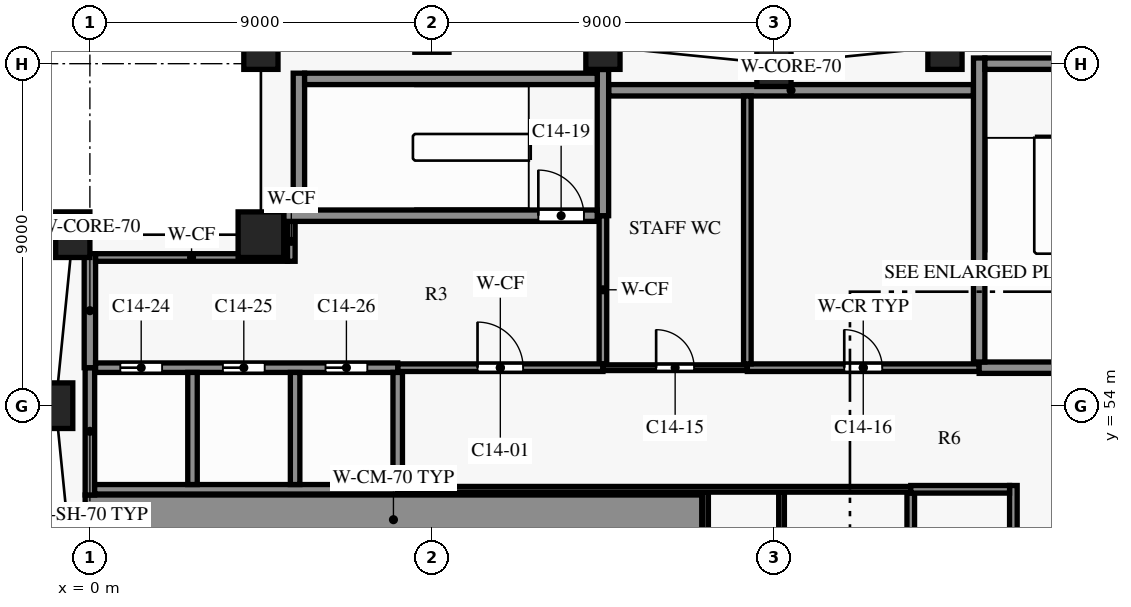
"""IFC4 building model, lengths in metres.
Left out: names, types, materials, properties, quantities, classifications, styles, units other than length and angle.
Written with IfcOpenShell. Run it as: python <this file> out.ifc"""

import sys

from ifc_helpers import new_model, si_unit, direction, frame, frame_2d, origin, origin_2d, place, context, subcontext, project, spatial, rectangle, extrude, element, fill, save


model = new_model("IFC4")
c1 = context("Model", 3, precision=1e-05, world=origin(), true_north=direction((0.0, 1.0)))
c2 = subcontext(c1, "Body", "Model", "MODEL_VIEW")
j1 = project(units=[si_unit("LENGTHUNIT", "METRE"), si_unit("PLANEANGLEUNIT", "RADIAN")], contexts=[c1])
p1 = place(None, origin())
s1 = spatial("IfcSite", under=j1, at=p1, CompositionType="ELEMENT")
p2 = place(p1, origin())
s2 = spatial("IfcBuilding", under=s1, at=p2, CompositionType="ELEMENT")
p3 = place(p2, frame((0.0, 0.0, 88.5)))
s3 = spatial("IfcBuildingStorey", under=s2, at=p3, CompositionType="ELEMENT", Elevation=88.5)
for number, where, z_axis, x_axis in (
    (1, (22.5, 63.45, 0.0), (0.0, 0.0, 1.0), (-0.995, -0.1, 0.0)),
    (2, (18.0, 63.0, 0.0), (0.0, 0.0, 1.0), (-1.0, 0.0, 0.0)),
    (3, (13.5, 63.45, 0.0), (0.0, 0.0, 1.0), (-0.995, 0.1, 0.0)),
    (4, (9.0, 63.9, 0.0), (0.0, 0.0, 1.0), (-1.0, 0.0, 0.0)),
    (5, (4.5, 63.45, 0.0), (0.0, 0.0, 1.0), (-0.995, -0.1, 0.0)),
    (6, (-0.45, 58.5, 0.0), (0.0, 0.0, 1.0), (-0.1, -0.995, 0.0)),
    (7, (-0.9, 54.0, 0.0), (0.0, 0.0, 1.0), (0.0, -1.0, 0.0)),
):
    element("IfcColumn", number, at=place(p3, frame(where, z_axis=z_axis, x_axis=x_axis)), inside=s3, PredefinedType="COLUMN", context=c2, shape_type="SweptSolid", body=[
        extrude(rectangle(XDim=0.9, YDim=1.2, at=origin_2d()), origin(), (0.0, 0.0, 1.0), 3.8),
    ])
p4 = place(p3, frame((4.5, 58.5, 0.0), z_axis=(0.0, 0.0, 1.0), x_axis=(1.0, 0.0, 0.0)))
e8 = element("IfcColumn", 8, at=p4, inside=s3, PredefinedType="COLUMN", context=c2, shape_type="SweptSolid", body=[
    extrude(rectangle(XDim=1.2, YDim=1.2, at=origin_2d()), origin(), (0.0, 0.0, 1.0), 3.8),
])
p5 = place(p3, frame((-0.125, 51.0, 0.0), z_axis=(0.0, 0.0, 1.0), x_axis=(1.0, 0.0, 0.0)))
e9 = element("IfcWall", 9, at=p5, inside=s3, PredefinedType="SHEAR", context=c2, shape_type="SweptSolid", body=[
    extrude(rectangle(XDim=16.225, YDim=1.3, at=frame_2d((8.113, 0.0))), origin(), (0.0, 0.0, 1.0), 3.5),
])
p6 = place(p3, frame((8.1, 51.8, 0.0), z_axis=(0.0, 0.0, 1.0), x_axis=(1.0, 0.0, 0.0)))
e10 = element("IfcWall", 10, at=p6, inside=s3, PredefinedType="PARTITIONING", context=c2, shape_type="SweptSolid", body=[
    extrude(rectangle(XDim=13.5, YDim=0.15, at=frame_2d((6.75, 0.0))), origin(), (0.0, 0.0, 1.0), 3.5),
])
p7 = place(p3, frame((21.6, 51.8, 0.0), z_axis=(0.0, 0.0, 1.0), x_axis=(1.0, 0.0, 0.0)))
e11 = element("IfcWall", 11, at=p7, inside=s3, PredefinedType="PARTITIONING", context=c2, shape_type="SweptSolid", body=[
    extrude(rectangle(XDim=2.6, YDim=0.2, at=frame_2d((1.3, 0.0))), origin(), (0.0, 0.0, 1.0), 3.5),
])
p8 = place(p3, frame((0.125, 51.8, 0.0), z_axis=(0.0, 0.0, 1.0), x_axis=(1.0, 0.0, 0.0)))
e12 = element("IfcWall", 12, at=p8, inside=s3, PredefinedType="SHEAR", context=c2, shape_type="SweptSolid", body=[
    extrude(rectangle(XDim=7.975, YDim=0.25, at=frame_2d((3.988, 0.0))), origin(), (0.0, 0.0, 1.0), 3.5),
])
p9 = place(p3, frame((8.1, 55.0, 0.0), z_axis=(0.0, 0.0, 1.0), x_axis=(1.0, 0.0, 0.0)))
e13 = element("IfcWall", 13, at=p9, inside=s3, PredefinedType="PARTITIONING", context=c2, shape_type="SweptSolid", body=[
    extrude(rectangle(XDim=5.4, YDim=0.2, at=frame_2d((2.7, 0.0))), origin(), (0.0, 0.0, 1.0), 3.5),
])
p10 = place(p9, frame((2.1, 0.0, 0.0)))
e14 = element("IfcOpeningElement", 14, at=p10, cuts=e13, PredefinedType="OPENING", context=c2, shape_type="SweptSolid", body=[
    extrude(rectangle(XDim=1.2, YDim=2.2, at=frame_2d((0.6, 1.1))), frame((0.0, 0.11, 0.0), z_axis=(0.0, -1.0, 0.0), x_axis=(1.0, 0.0, 0.0)), (0.0, 0.0, 1.0), 0.22),
])
p11 = place(p3, frame((13.5, 55.0, 0.0), z_axis=(0.0, 0.0, 1.0), x_axis=(1.0, 0.0, 0.0)))
e15 = element("IfcWall", 15, at=p11, inside=s3, PredefinedType="PARTITIONING", context=c2, shape_type="SweptSolid", body=[
    extrude(rectangle(XDim=3.8, YDim=0.15, at=frame_2d((1.9, 0.0))), origin(), (0.0, 0.0, 1.0), 3.5),
])
p12 = place(p11, frame((1.4, 0.0, 0.0)))
e16 = element("IfcOpeningElement", 16, at=p12, cuts=e15, PredefinedType="OPENING", context=c2, shape_type="SweptSolid", body=[
    extrude(rectangle(XDim=1.0, YDim=2.1, at=frame_2d((0.5, 1.05))), frame((0.0, 0.085, 0.0), z_axis=(0.0, -1.0, 0.0), x_axis=(1.0, 0.0, 0.0)), (0.0, 0.0, 1.0), 0.17),
])
p13 = place(p3, frame((17.3, 55.0, 0.0), z_axis=(0.0, 0.0, 1.0), x_axis=(1.0, 0.0, 0.0)))
e17 = element("IfcWall", 17, at=p13, inside=s3, PredefinedType="PARTITIONING", context=c2, shape_type="SweptSolid", body=[
    extrude(rectangle(XDim=6.1, YDim=0.2, at=frame_2d((3.05, 0.0))), origin(), (0.0, 0.0, 1.0), 3.5),
])
p14 = place(p13, frame((2.55, 0.0, 0.0)))
e18 = element("IfcOpeningElement", 18, at=p14, cuts=e17, PredefinedType="OPENING", context=c2, shape_type="SweptSolid", body=[
    extrude(rectangle(XDim=1.0, YDim=2.1, at=frame_2d((0.5, 1.05))), frame((0.0, 0.11, 0.0), z_axis=(0.0, -1.0, 0.0), x_axis=(1.0, 0.0, 0.0)), (0.0, 0.0, 1.0), 0.22),
])
p15 = place(p3, frame((0.15, 55.0, 0.0), z_axis=(0.0, 0.0, 1.0), x_axis=(1.0, 0.0, 0.0)))
e19 = element("IfcWall", 19, at=p15, inside=s3, PredefinedType="SHEAR", context=c2, shape_type="SweptSolid", body=[
    extrude(rectangle(XDim=7.95, YDim=0.25, at=frame_2d((3.975, 0.0))), origin(), (0.0, 0.0, 1.0), 3.5),
])
p16 = place(p15, frame((0.65, 0.0, 0.0)))
e20 = element("IfcOpeningElement", 20, at=p16, cuts=e19, PredefinedType="OPENING", context=c2, shape_type="SweptSolid", body=[
    extrude(rectangle(XDim=1.1, YDim=2.1, at=frame_2d((0.55, 1.05))), frame((0.0, 0.135, 0.0), z_axis=(0.0, -1.0, 0.0), x_axis=(1.0, 0.0, 0.0)), (0.0, 0.0, 1.0), 0.27),
])
p17 = place(p15, frame((3.35, 0.0, 0.0)))
e21 = element("IfcOpeningElement", 21, at=p17, cuts=e19, PredefinedType="OPENING", context=c2, shape_type="SweptSolid", body=[
    extrude(rectangle(XDim=1.1, YDim=2.1, at=frame_2d((0.55, 1.05))), frame((0.0, 0.135, 0.0), z_axis=(0.0, -1.0, 0.0), x_axis=(1.0, 0.0, 0.0)), (0.0, 0.0, 1.0), 0.27),
])
p18 = place(p15, frame((6.05, 0.0, 0.0)))
e22 = element("IfcOpeningElement", 22, at=p18, cuts=e19, PredefinedType="OPENING", context=c2, shape_type="SweptSolid", body=[
    extrude(rectangle(XDim=1.1, YDim=2.1, at=frame_2d((0.55, 1.05))), frame((0.0, 0.135, 0.0), z_axis=(0.0, -1.0, 0.0), x_axis=(1.0, 0.0, 0.0)), (0.0, 0.0, 1.0), 0.27),
])
p19 = place(p3, frame((23.4, 55.0, 0.0), z_axis=(0.0, 0.0, 1.0), x_axis=(1.0, 0.0, 0.0)))
e23 = element("IfcWall", 23, at=p19, inside=s3, PredefinedType="SHEAR", context=c2, shape_type="SweptSolid", body=[
    extrude(rectangle(XDim=3.45, YDim=0.3, at=frame_2d((1.725, 0.0))), origin(), (0.0, 0.0, 1.0), 3.5),
])
p20 = place(p3, frame((0.15, 57.9, 0.0), z_axis=(0.0, 0.0, 1.0), x_axis=(1.0, 0.0, 0.0)))
e24 = element("IfcWall", 24, at=p20, inside=s3, PredefinedType="PARTITIONING", context=c2, shape_type="SweptSolid", body=[
    extrude(rectangle(XDim=5.05, YDim=0.2, at=frame_2d((2.525, 0.0))), origin(), (0.0, 0.0, 1.0), 3.5),
])
p21 = place(p3, frame((5.1, 59.0, 0.0), z_axis=(0.0, 0.0, 1.0), x_axis=(1.0, 0.0, 0.0)))
e25 = element("IfcWall", 25, at=p21, inside=s3, PredefinedType="SHEAR", context=c2, shape_type="SweptSolid", body=[
    extrude(rectangle(XDim=8.25, YDim=0.3, at=frame_2d((4.125, 0.0))), origin(), (0.0, 0.0, 1.0), 3.5),
])
p22 = place(p21, frame((6.7, 0.0, 0.0)))
e26 = element("IfcOpeningElement", 26, at=p22, cuts=e25, PredefinedType="OPENING", context=c2, shape_type="SweptSolid", body=[
    extrude(rectangle(XDim=1.2, YDim=2.2, at=frame_2d((0.6, 1.1))), frame((0.0, 0.16, 0.0), z_axis=(0.0, -1.0, 0.0), x_axis=(1.0, 0.0, 0.0)), (0.0, 0.0, 1.0), 0.32),
])
p23 = place(p3, frame((13.65, 62.3, 0.0), z_axis=(0.0, 0.0, 1.0), x_axis=(1.0, 0.0, 0.0)))
e27 = element("IfcWall", 27, at=p23, inside=s3, PredefinedType="SHEAR", context=c2, shape_type="SweptSolid", body=[
    extrude(rectangle(XDim=9.6, YDim=0.3, at=frame_2d((4.8, 0.0))), origin(), (0.0, 0.0, 1.0), 3.5),
])
p24 = place(p3, frame((5.65, 62.6, 0.0), z_axis=(0.0, 0.0, 1.0), x_axis=(1.0, 0.0, 0.0)))
e28 = element("IfcWall", 28, at=p24, inside=s3, PredefinedType="SHEAR", context=c2, shape_type="SweptSolid", body=[
    extrude(rectangle(XDim=7.7, YDim=0.3, at=frame_2d((3.85, 0.0))), origin(), (0.0, 0.0, 1.0), 3.5),
])
p25 = place(p3, frame((23.55, 63.0, 0.0), z_axis=(0.0, 0.0, 1.0), x_axis=(1.0, 0.0, 0.0)))
e29 = element("IfcWall", 29, at=p25, inside=s3, PredefinedType="SHEAR", context=c2, shape_type="SweptSolid", body=[
    extrude(rectangle(XDim=3.3, YDim=0.3, at=frame_2d((1.65, 0.0))), origin(), (0.0, 0.0, 1.0), 3.5),
])
p26 = place(p3, frame((0.0, 55.0, 0.0), z_axis=(0.0, 0.0, 1.0), x_axis=(0.0, 1.0, 0.0)))
e30 = element("IfcWall", 30, at=p26, inside=s3, PredefinedType="SHEAR", context=c2, shape_type="SweptSolid", body=[
    extrude(rectangle(XDim=3.0, YDim=0.3, at=frame_2d((1.5, 0.0))), origin(), (0.0, 0.0, 1.0), 3.5),
])
p27 = place(p3, frame((0.0, 51.65, 0.0), z_axis=(0.0, 0.0, 1.0), x_axis=(0.0, 1.0, 0.0)))
e31 = element("IfcWall", 31, at=p27, inside=s3, PredefinedType="SHEAR", context=c2, shape_type="SweptSolid", body=[
    extrude(rectangle(XDim=3.35, YDim=0.25, at=frame_2d((1.675, 0.0))), origin(), (0.0, 0.0, 1.0), 3.5),
])
p28 = place(p3, frame((2.7, 51.925, 0.0), z_axis=(0.0, 0.0, 1.0), x_axis=(0.0, 1.0, 0.0)))
e32 = element("IfcWall", 32, at=p28, inside=s3, PredefinedType="SHEAR", context=c2, shape_type="SweptSolid", body=[
    extrude(rectangle(XDim=2.95, YDim=0.25, at=frame_2d((1.475, 0.0))), origin(), (0.0, 0.0, 1.0), 3.5),
])
p29 = place(p3, frame((5.3, 57.8, 0.0), z_axis=(0.0, 0.0, 1.0), x_axis=(0.0, 1.0, 0.0)))
e33 = element("IfcWall", 33, at=p29, inside=s3, PredefinedType="PARTITIONING", context=c2, shape_type="SweptSolid", body=[
    extrude(rectangle(XDim=1.05, YDim=0.2, at=frame_2d((0.525, 0.0))), origin(), (0.0, 0.0, 1.0), 3.5),
])
p30 = place(p3, frame((5.4, 51.925, 0.0), z_axis=(0.0, 0.0, 1.0), x_axis=(0.0, 1.0, 0.0)))
e34 = element("IfcWall", 34, at=p30, inside=s3, PredefinedType="SHEAR", context=c2, shape_type="SweptSolid", body=[
    extrude(rectangle(XDim=2.95, YDim=0.25, at=frame_2d((1.475, 0.0))), origin(), (0.0, 0.0, 1.0), 3.5),
])
p31 = place(p3, frame((5.5, 59.15, 0.0), z_axis=(0.0, 0.0, 1.0), x_axis=(0.0, 1.0, 0.0)))
e35 = element("IfcWall", 35, at=p31, inside=s3, PredefinedType="SHEAR", context=c2, shape_type="SweptSolid", body=[
    extrude(rectangle(XDim=3.6, YDim=0.3, at=frame_2d((1.8, 0.0))), origin(), (0.0, 0.0, 1.0), 3.5),
])
p32 = place(p3, frame((8.1, 51.925, 0.0), z_axis=(0.0, 0.0, 1.0), x_axis=(0.0, 1.0, 0.0)))
e36 = element("IfcWall", 36, at=p32, inside=s3, PredefinedType="SHEAR", context=c2, shape_type="SweptSolid", body=[
    extrude(rectangle(XDim=2.95, YDim=0.25, at=frame_2d((1.475, 0.0))), origin(), (0.0, 0.0, 1.0), 3.5),
])
p33 = place(p3, frame((13.5, 55.1, 0.0), z_axis=(0.0, 0.0, 1.0), x_axis=(0.0, 1.0, 0.0)))
e37 = element("IfcWall", 37, at=p33, inside=s3, PredefinedType="PARTITIONING", context=c2, shape_type="SweptSolid", body=[
    extrude(rectangle(XDim=3.9, YDim=0.2, at=frame_2d((1.95, 0.0))), origin(), (0.0, 0.0, 1.0), 3.5),
])
p34 = place(p3, frame((13.5, 59.0, 0.0), z_axis=(0.0, 0.0, 1.0), x_axis=(0.0, 1.0, 0.0)))
e38 = element("IfcWall", 38, at=p34, inside=s3, PredefinedType="SHEAR", context=c2, shape_type="SweptSolid", body=[
    extrude(rectangle(XDim=3.847, YDim=0.3, at=frame_2d((1.923, 0.0))), origin(), (0.0, 0.0, 1.0), 3.5),
])
p35 = place(p3, frame((16.2, 50.2, 0.0), z_axis=(0.0, 0.0, 1.0), x_axis=(0.0, 1.0, 0.0)))
e39 = element("IfcWall", 39, at=p35, inside=s3, PredefinedType="PARTITIONING", context=c2, shape_type="SweptSolid", body=[
    extrude(rectangle(XDim=1.525, YDim=0.15, at=frame_2d((0.763, 0.0))), origin(), (0.0, 0.0, 1.0), 3.5),
])
p36 = place(p3, frame((17.3, 55.1, 0.0), z_axis=(0.0, 0.0, 1.0), x_axis=(0.0, 1.0, 0.0)))
e40 = element("IfcWall", 40, at=p36, inside=s3, PredefinedType="PARTITIONING", context=c2, shape_type="SweptSolid", body=[
    extrude(rectangle(XDim=7.05, YDim=0.2, at=frame_2d((3.525, 0.0))), origin(), (0.0, 0.0, 1.0), 3.5),
])
p37 = place(p3, frame((18.2, 47.1, 0.0), z_axis=(0.0, 0.0, 1.0), x_axis=(0.0, 1.0, 0.0)))
e41 = element("IfcWall", 41, at=p37, inside=s3, PredefinedType="PARTITIONING", context=c2, shape_type="SweptSolid", body=[
    extrude(rectangle(XDim=4.625, YDim=0.15, at=frame_2d((2.312, 0.0))), origin(), (0.0, 0.0, 1.0), 3.5),
])
p38 = place(p3, frame((21.6, 47.1, 0.0), z_axis=(0.0, 0.0, 1.0), x_axis=(0.0, 1.0, 0.0)))
e42 = element("IfcWall", 42, at=p38, inside=s3, PredefinedType="PARTITIONING", context=c2, shape_type="SweptSolid", body=[
    extrude(rectangle(XDim=4.6, YDim=0.2, at=frame_2d((2.3, 0.0))), origin(), (0.0, 0.0, 1.0), 3.5),
])
p39 = place(p3, frame((23.4, 55.15, 0.0), z_axis=(0.0, 0.0, 1.0), x_axis=(0.0, 1.0, 0.0)))
e43 = element("IfcWall", 43, at=p39, inside=s3, PredefinedType="SHEAR", context=c2, shape_type="SweptSolid", body=[
    extrude(rectangle(XDim=8.0, YDim=0.3, at=frame_2d((4.0, 0.0))), origin(), (0.0, 0.0, 1.0), 3.5),
])
p40 = place(p3, frame((24.3, 46.9, 0.0), z_axis=(0.0, 0.0, 1.0), x_axis=(0.0, 1.0, 0.0)))
e44 = element("IfcWall", 44, at=p40, inside=s3, PredefinedType="SHEAR", context=c2, shape_type="SweptSolid", body=[
    extrude(rectangle(XDim=5.0, YDim=0.2, at=frame_2d((2.5, 0.0))), origin(), (0.0, 0.0, 1.0), 3.5),
])
p41 = place(p10, origin())
e45 = element("IfcDoor", 45, at=p41, inside=s3, OperationType="SINGLE_SWING_RIGHT", PredefinedType="DOOR", context=c2, shape_type="SweptSolid", body=[
    extrude(rectangle(XDim=1.2, YDim=2.2, at=frame_2d((0.6, 1.1))), frame((0.0, 0.025, 0.0), z_axis=(0.0, -1.0, 0.0), x_axis=(1.0, 0.0, 0.0)), (0.0, 0.0, 1.0), 0.05),
])
fill(e14, e45)
p42 = place(p12, origin())
e46 = element("IfcDoor", 46, at=p42, inside=s3, OperationType="SINGLE_SWING_LEFT", PredefinedType="DOOR", context=c2, shape_type="SweptSolid", body=[
    extrude(rectangle(XDim=1.0, YDim=2.1, at=frame_2d((0.5, 1.05))), frame((0.0, 0.025, 0.0), z_axis=(0.0, -1.0, 0.0), x_axis=(1.0, 0.0, 0.0)), (0.0, 0.0, 1.0), 0.05),
])
fill(e16, e46)
p43 = place(p14, origin())
e47 = element("IfcDoor", 47, at=p43, inside=s3, OperationType="SINGLE_SWING_RIGHT", PredefinedType="DOOR", context=c2, shape_type="SweptSolid", body=[
    extrude(rectangle(XDim=1.0, YDim=2.1, at=frame_2d((0.5, 1.05))), frame((0.0, 0.025, 0.0), z_axis=(0.0, -1.0, 0.0), x_axis=(1.0, 0.0, 0.0)), (0.0, 0.0, 1.0), 0.05),
])
fill(e18, e47)
p44 = place(p22, origin())
e48 = element("IfcDoor", 48, at=p44, inside=s3, OperationType="SINGLE_SWING_RIGHT", PredefinedType="DOOR", context=c2, shape_type="SweptSolid", body=[
    extrude(rectangle(XDim=1.2, YDim=2.2, at=frame_2d((0.6, 1.1))), frame((0.0, 0.025, 0.0), z_axis=(0.0, -1.0, 0.0), x_axis=(1.0, 0.0, 0.0)), (0.0, 0.0, 1.0), 0.05),
])
fill(e26, e48)
p45 = place(p16, origin())
e49 = element("IfcDoor", 49, at=p45, inside=s3, OperationType="DOUBLE_DOOR_SLIDING", PredefinedType="DOOR", context=c2, shape_type="SweptSolid", body=[
    extrude(rectangle(XDim=1.1, YDim=2.1, at=frame_2d((0.55, 1.05))), frame((0.0, 0.025, 0.0), z_axis=(0.0, -1.0, 0.0), x_axis=(1.0, 0.0, 0.0)), (0.0, 0.0, 1.0), 0.05),
])
fill(e20, e49)
p46 = place(p17, origin())
e50 = element("IfcDoor", 50, at=p46, inside=s3, OperationType="DOUBLE_DOOR_SLIDING", PredefinedType="DOOR", context=c2, shape_type="SweptSolid", body=[
    extrude(rectangle(XDim=1.1, YDim=2.1, at=frame_2d((0.55, 1.05))), frame((0.0, 0.025, 0.0), z_axis=(0.0, -1.0, 0.0), x_axis=(1.0, 0.0, 0.0)), (0.0, 0.0, 1.0), 0.05),
])
fill(e21, e50)
p47 = place(p18, origin())
e51 = element("IfcDoor", 51, at=p47, inside=s3, OperationType="DOUBLE_DOOR_SLIDING", PredefinedType="DOOR", context=c2, shape_type="SweptSolid", body=[
    extrude(rectangle(XDim=1.1, YDim=2.1, at=frame_2d((0.55, 1.05))), frame((0.0, 0.025, 0.0), z_axis=(0.0, -1.0, 0.0), x_axis=(1.0, 0.0, 0.0)), (0.0, 0.0, 1.0), 0.05),
])
fill(e22, e51)
save(model, sys.argv[1])
